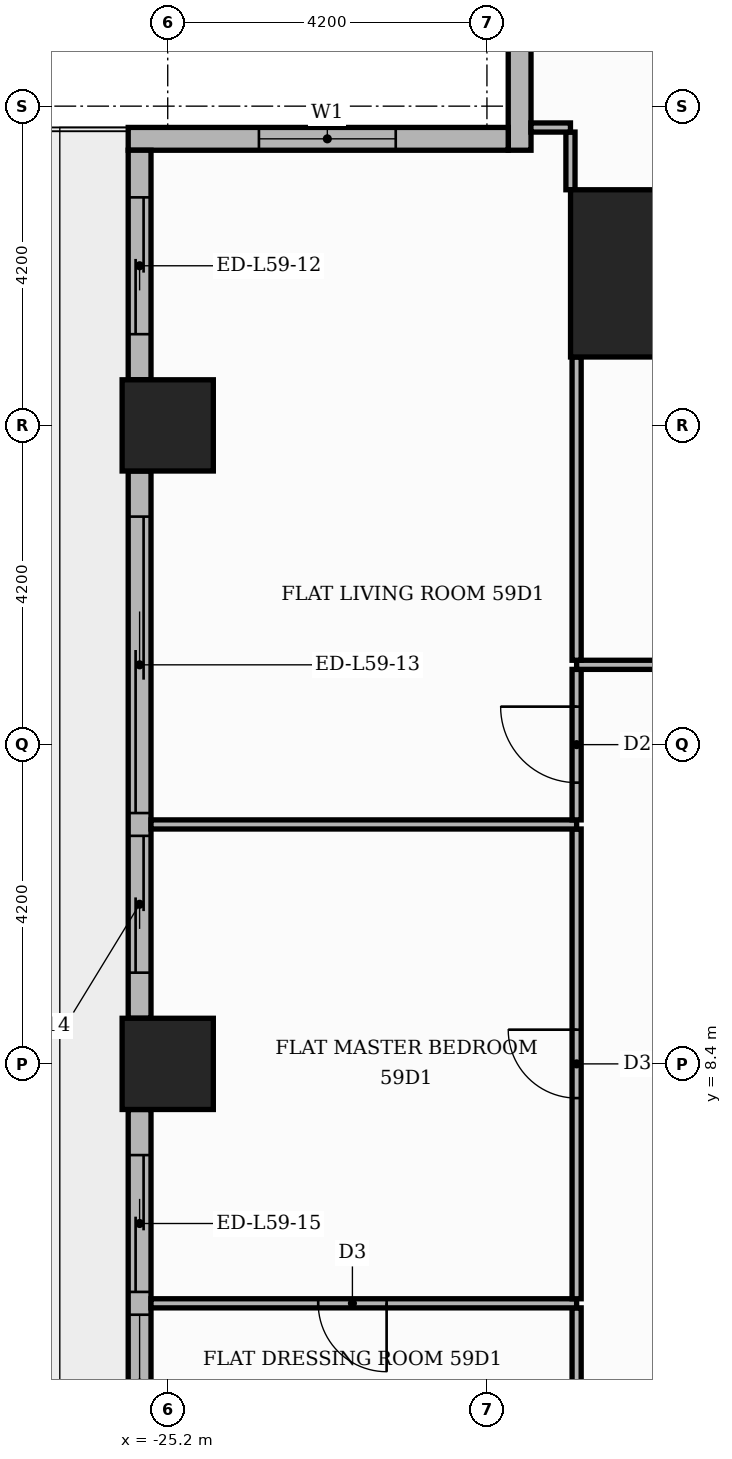
"""IFC4 building model, lengths in metres.
Left out: names, types, materials, properties, quantities, classifications, styles, units other than length and angle.
Written with IfcOpenShell. Run it as: python <this file> out.ifc"""

import sys

from ifc_helpers import new_model, si_unit, direction, frame, frame_2d, origin, origin_2d, place, context, subcontext, project, spatial, rectangle, extrude, element, fill, save


model = new_model("IFC4")
c1 = context("Model", 3, precision=1e-05, world=origin(), true_north=direction((0.0, 1.0)))
c2 = subcontext(c1, "Body", "Model", "MODEL_VIEW")
j1 = project(units=[si_unit("LENGTHUNIT", "METRE"), si_unit("PLANEANGLEUNIT", "RADIAN")], contexts=[c1])
p1 = place(None, origin())
s1 = spatial("IfcSite", under=j1, at=p1, CompositionType="ELEMENT")
p2 = place(p1, origin())
s2 = spatial("IfcBuilding", under=s1, at=p2, CompositionType="ELEMENT")
p3 = place(p2, frame((0.0, 0.0, 248.4)))
s3 = spatial("IfcBuildingStorey", under=s2, at=p3, CompositionType="ELEMENT", Elevation=248.4)
p4 = place(p3, frame((-18.8, 18.8, 0.0), z_axis=(0.0, 0.0, 1.0), x_axis=(1.0, 0.0, 0.0)))
e1 = element("IfcColumn", 1, at=p4, inside=s3, PredefinedType="COLUMN", context=c2, shape_type="SweptSolid", body=[
    extrude(rectangle(XDim=2.2, YDim=2.2, at=origin_2d()), origin(), (0.0, 0.0, 1.0), 3.9),
])
for number, where, z_axis, x_axis in (
    (2, (-25.2, 8.4, 0.0), (0.0, 0.0, 1.0), (1.0, 0.0, 0.0)),
    (3, (-25.2, 16.8, 0.0), (0.0, 0.0, 1.0), (1.0, 0.0, 0.0)),
):
    element("IfcColumn", number, at=place(p3, frame(where, z_axis=z_axis, x_axis=x_axis)), inside=s3, PredefinedType="COLUMN", context=c2, shape_type="SweptSolid", body=[
        extrude(rectangle(XDim=1.2, YDim=1.2, at=origin_2d()), origin(), (0.0, 0.0, 1.0), 3.9),
    ])
p5 = place(p3, frame((-20.57, 25.42, 0.0), z_axis=(0.0, 0.0, 1.0), x_axis=(0.0, -1.0, 0.0)))
e4 = element("IfcWall", 4, at=p5, inside=s3, PredefinedType="STANDARD", context=c2, shape_type="SweptSolid", body=[
    extrude(rectangle(XDim=5.0, YDim=0.3, at=frame_2d((2.5, 0.0))), origin(), (0.0, 0.0, 1.0), 3.48),
])
p6 = place(p5, frame((1.42, 0.0, 0.9)))
e5 = element("IfcOpeningElement", 5, at=p6, cuts=e4, PredefinedType="OPENING", context=c2, shape_type="SweptSolid", body=[
    extrude(rectangle(XDim=1.8, YDim=2.1, at=frame_2d((0.9, 1.05))), frame((0.0, 0.16, 0.0), z_axis=(0.0, -1.0, 0.0), x_axis=(1.0, 0.0, 0.0)), (0.0, 0.0, 1.0), 0.32),
])
p7 = place(p3, frame((-20.72, 20.57, 0.0), z_axis=(0.0, 0.0, 1.0), x_axis=(-1.0, 0.0, 0.0)))
e6 = element("IfcWall", 6, at=p7, inside=s3, PredefinedType="STANDARD", context=c2, shape_type="SweptSolid", body=[
    extrude(rectangle(XDim=5.0, YDim=0.3, at=frame_2d((2.5, 0.0))), origin(), (0.0, 0.0, 1.0), 3.48),
])
p8 = place(p7, frame((1.48, 0.0, 0.9)))
e7 = element("IfcOpeningElement", 7, at=p8, cuts=e6, PredefinedType="OPENING", context=c2, shape_type="SweptSolid", body=[
    extrude(rectangle(XDim=1.8, YDim=2.1, at=frame_2d((0.9, 1.05))), frame((0.0, 0.16, 0.0), z_axis=(0.0, -1.0, 0.0), x_axis=(1.0, 0.0, 0.0)), (0.0, 0.0, 1.0), 0.32),
])
p9 = place(p3, frame((-25.57, 20.42, 0.0), z_axis=(0.0, 0.0, 1.0), x_axis=(0.0, -1.0, 0.0)))
e8 = element("IfcWall", 8, at=p9, inside=s3, PredefinedType="STANDARD", context=c2, shape_type="SweptSolid", body=[
    extrude(rectangle(XDim=3.02, YDim=0.3, at=frame_2d((1.51, 0.0))), origin(), (0.0, 0.0, 1.0), 3.48),
])
p10 = place(p9, frame((0.62, 0.0, 0.0)))
e9 = element("IfcOpeningElement", 9, at=p10, cuts=e8, PredefinedType="OPENING", context=c2, shape_type="SweptSolid", body=[
    extrude(rectangle(XDim=1.8, YDim=2.4, at=frame_2d((0.9, 1.2))), frame((0.0, 0.16, 0.0), z_axis=(0.0, -1.0, 0.0), x_axis=(1.0, 0.0, 0.0)), (0.0, 0.0, 1.0), 0.32),
])
p11 = place(p3, frame((-25.57, 16.2, 0.0), z_axis=(0.0, 0.0, 1.0), x_axis=(0.0, -1.0, 0.0)))
e10 = element("IfcWall", 10, at=p11, inside=s3, PredefinedType="STANDARD", context=c2, shape_type="SweptSolid", body=[
    extrude(rectangle(XDim=7.2, YDim=0.3, at=frame_2d((3.6, 0.0))), origin(), (0.0, 0.0, 1.0), 3.48),
])
p12 = place(p11, frame((0.6, 0.0, 0.0)))
e11 = element("IfcOpeningElement", 11, at=p12, cuts=e10, PredefinedType="OPENING", context=c2, shape_type="SweptSolid", body=[
    extrude(rectangle(XDim=3.9, YDim=2.4, at=frame_2d((1.95, 1.2))), frame((0.0, 0.16, 0.0), z_axis=(0.0, -1.0, 0.0), x_axis=(1.0, 0.0, 0.0)), (0.0, 0.0, 1.0), 0.32),
])
p13 = place(p11, frame((4.8, 0.0, 0.0)))
e12 = element("IfcOpeningElement", 12, at=p13, cuts=e10, PredefinedType="OPENING", context=c2, shape_type="SweptSolid", body=[
    extrude(rectangle(XDim=1.8, YDim=2.4, at=frame_2d((0.9, 1.2))), frame((0.0, 0.16, 0.0), z_axis=(0.0, -1.0, 0.0), x_axis=(1.0, 0.0, 0.0)), (0.0, 0.0, 1.0), 0.32),
])
p14 = place(p3, frame((-25.57, 7.8, 0.0), z_axis=(0.0, 0.0, 1.0), x_axis=(0.0, -1.0, 0.0)))
e13 = element("IfcWall", 13, at=p14, inside=s3, PredefinedType="STANDARD", context=c2, shape_type="SweptSolid", body=[
    extrude(rectangle(XDim=7.2, YDim=0.3, at=frame_2d((3.6, 0.0))), origin(), (0.0, 0.0, 1.0), 3.48),
])
p15 = place(p14, frame((0.6, 0.0, 0.0)))
e14 = element("IfcOpeningElement", 14, at=p15, cuts=e13, PredefinedType="OPENING", context=c2, shape_type="SweptSolid", body=[
    extrude(rectangle(XDim=1.8, YDim=2.4, at=frame_2d((0.9, 1.2))), frame((0.0, 0.16, 0.0), z_axis=(0.0, -1.0, 0.0), x_axis=(1.0, 0.0, 0.0)), (0.0, 0.0, 1.0), 0.32),
])
p16 = place(p14, frame((2.7, 0.0, 0.9)))
e15 = element("IfcOpeningElement", 15, at=p16, cuts=e13, PredefinedType="OPENING", context=c2, shape_type="SweptSolid", body=[
    extrude(rectangle(XDim=1.8, YDim=2.1, at=frame_2d((0.9, 1.05))), frame((0.0, 0.16, 0.0), z_axis=(0.0, -1.0, 0.0), x_axis=(1.0, 0.0, 0.0)), (0.0, 0.0, 1.0), 0.32),
])
p17 = place(p14, frame((4.8, 0.0, 0.9)))
e16 = element("IfcOpeningElement", 16, at=p17, cuts=e13, PredefinedType="OPENING", context=c2, shape_type="SweptSolid", body=[
    extrude(rectangle(XDim=1.8, YDim=2.1, at=frame_2d((0.9, 1.05))), frame((0.0, 0.16, 0.0), z_axis=(0.0, -1.0, 0.0), x_axis=(1.0, 0.0, 0.0)), (0.0, 0.0, 1.0), 0.32),
])
p18 = place(p3, frame((-19.82, 3.21, 0.0), z_axis=(0.0, 0.0, 1.0), x_axis=(0.0, 1.0, 0.0)))
e17 = element("IfcWall", 17, at=p18, inside=s3, PredefinedType="PARTITIONING", context=c2, shape_type="SweptSolid", body=[
    extrude(rectangle(XDim=1.98, YDim=0.12, at=frame_2d((0.99, 0.0))), origin(), (0.0, 0.0, 1.0), 3.48),
])
p19 = place(p3, frame((-25.42, 5.25, 0.0), z_axis=(0.0, 0.0, 1.0), x_axis=(1.0, 0.0, 0.0)))
e18 = element("IfcWall", 18, at=p19, inside=s3, PredefinedType="PARTITIONING", context=c2, shape_type="SweptSolid", body=[
    extrude(rectangle(XDim=5.6, YDim=0.12, at=frame_2d((2.8, 0.0))), origin(), (0.0, 0.0, 1.0), 3.48),
])
p20 = place(p19, frame((2.2, 0.0, 0.0)))
e19 = element("IfcOpeningElement", 19, at=p20, cuts=e18, PredefinedType="OPENING", context=c2, shape_type="SweptSolid", body=[
    extrude(rectangle(XDim=0.9, YDim=2.1, at=frame_2d((0.45, 1.05))), frame((0.0, 0.07, 0.0), z_axis=(0.0, -1.0, 0.0), x_axis=(1.0, 0.0, 0.0)), (0.0, 0.0, 1.0), 0.14),
])
p21 = place(p3, frame((-19.82, 5.31, 0.0), z_axis=(0.0, 0.0, 1.0), x_axis=(0.0, 1.0, 0.0)))
e20 = element("IfcWall", 20, at=p21, inside=s3, PredefinedType="PARTITIONING", context=c2, shape_type="SweptSolid", body=[
    extrude(rectangle(XDim=6.18, YDim=0.12, at=frame_2d((3.09, 0.0))), origin(), (0.0, 0.0, 1.0), 3.48),
])
p22 = place(p21, frame((2.64, 0.0, 0.0)))
e21 = element("IfcOpeningElement", 21, at=p22, cuts=e20, PredefinedType="OPENING", context=c2, shape_type="SweptSolid", body=[
    extrude(rectangle(XDim=0.9, YDim=2.1, at=frame_2d((0.45, 1.05))), frame((0.0, 0.07, 0.0), z_axis=(0.0, -1.0, 0.0), x_axis=(1.0, 0.0, 0.0)), (0.0, 0.0, 1.0), 0.14),
])
p23 = place(p3, frame((-25.42, 11.55, 0.0), z_axis=(0.0, 0.0, 1.0), x_axis=(1.0, 0.0, 0.0)))
e22 = element("IfcWall", 22, at=p23, inside=s3, PredefinedType="PARTITIONING", context=c2, shape_type="SweptSolid", body=[
    extrude(rectangle(XDim=5.6, YDim=0.12, at=frame_2d((2.8, 0.0))), origin(), (0.0, 0.0, 1.0), 3.48),
])
p24 = place(p3, frame((-19.82, 11.61, 0.0), z_axis=(0.0, 0.0, 1.0), x_axis=(0.0, 1.0, 0.0)))
e23 = element("IfcWall", 23, at=p24, inside=s3, PredefinedType="PARTITIONING", context=c2, shape_type="SweptSolid", body=[
    extrude(rectangle(XDim=1.98, YDim=0.12, at=frame_2d((0.99, 0.0))), origin(), (0.0, 0.0, 1.0), 3.48),
])
p25 = place(p24, frame((0.49, 0.0, 0.0)))
e24 = element("IfcOpeningElement", 24, at=p25, cuts=e23, PredefinedType="OPENING", context=c2, shape_type="SweptSolid", body=[
    extrude(rectangle(XDim=1.0, YDim=2.1, at=frame_2d((0.5, 1.05))), frame((0.0, 0.07, 0.0), z_axis=(0.0, -1.0, 0.0), x_axis=(1.0, 0.0, 0.0)), (0.0, 0.0, 1.0), 0.14),
])
p26 = place(p3, frame((-19.82, 13.65, 0.0), z_axis=(0.0, 0.0, 1.0), x_axis=(1.0, 0.0, 0.0)))
e25 = element("IfcWall", 25, at=p26, inside=s3, PredefinedType="PARTITIONING", context=c2, shape_type="SweptSolid", body=[
    extrude(rectangle(XDim=6.17, YDim=0.12, at=frame_2d((3.085, 0.0))), origin(), (0.0, 0.0, 1.0), 3.48),
])
p27 = place(p26, frame((2.635, 0.0, 0.0)))
e26 = element("IfcOpeningElement", 26, at=p27, cuts=e25, PredefinedType="OPENING", context=c2, shape_type="SweptSolid", body=[
    extrude(rectangle(XDim=0.9, YDim=2.1, at=frame_2d((0.45, 1.05))), frame((0.0, 0.07, 0.0), z_axis=(0.0, -1.0, 0.0), x_axis=(1.0, 0.0, 0.0)), (0.0, 0.0, 1.0), 0.14),
])
p28 = place(p3, frame((-19.82, 13.71, 0.0), z_axis=(0.0, 0.0, 1.0), x_axis=(0.0, 1.0, 0.0)))
e27 = element("IfcWall", 27, at=p28, inside=s3, PredefinedType="PARTITIONING", context=c2, shape_type="SweptSolid", body=[
    extrude(rectangle(XDim=3.99, YDim=0.12, at=frame_2d((1.995, 0.0))), origin(), (0.0, 0.0, 1.0), 3.48),
])
p29 = place(p3, frame((-19.901, 19.9, 0.0), z_axis=(0.0, 0.0, 1.0), x_axis=(0.0, 1.0, 0.0)))
e28 = element("IfcWall", 28, at=p29, inside=s3, PredefinedType="PARTITIONING", context=c2, shape_type="SweptSolid", body=[
    extrude(rectangle(XDim=0.759, YDim=0.12, at=frame_2d((0.379, 0.0))), origin(), (0.0, 0.0, 1.0), 3.48),
])
p30 = place(p3, frame((-20.421, 20.719, 0.0), z_axis=(0.0, 0.0, 1.0), x_axis=(1.0, 0.0, 0.0)))
e29 = element("IfcWall", 29, at=p30, inside=s3, PredefinedType="PARTITIONING", context=c2, shape_type="SweptSolid", body=[
    extrude(rectangle(XDim=0.52, YDim=0.12, at=frame_2d((0.26, 0.0))), origin(), (0.0, 0.0, 1.0), 3.48),
])
p31 = place(p8, origin())
e30 = element("IfcWindow", 30, at=p31, inside=s3, PartitioningType="SINGLE_PANEL", PredefinedType="WINDOW", context=c2, shape_type="SweptSolid", body=[
    extrude(rectangle(XDim=1.8, YDim=2.1, at=frame_2d((0.9, 1.05))), frame((0.0, 0.03, 0.0), z_axis=(0.0, -1.0, 0.0), x_axis=(1.0, 0.0, 0.0)), (0.0, 0.0, 1.0), 0.06),
])
fill(e7, e30)
p32 = place(p10, origin())
e31 = element("IfcDoor", 31, at=p32, inside=s3, OperationType="SLIDING_TO_RIGHT", PredefinedType="DOOR", context=c2, shape_type="SweptSolid", body=[
    extrude(rectangle(XDim=1.8, YDim=2.4, at=frame_2d((0.9, 1.2))), frame((0.0, 0.025, 0.0), z_axis=(0.0, -1.0, 0.0), x_axis=(1.0, 0.0, 0.0)), (0.0, 0.0, 1.0), 0.05),
])
fill(e9, e31)
p33 = place(p12, origin())
e32 = element("IfcDoor", 32, at=p33, inside=s3, OperationType="SLIDING_TO_LEFT", PredefinedType="DOOR", context=c2, shape_type="SweptSolid", body=[
    extrude(rectangle(XDim=3.9, YDim=2.4, at=frame_2d((1.95, 1.2))), frame((0.0, 0.025, 0.0), z_axis=(0.0, -1.0, 0.0), x_axis=(1.0, 0.0, 0.0)), (0.0, 0.0, 1.0), 0.05),
])
fill(e11, e32)
p34 = place(p13, origin())
e33 = element("IfcDoor", 33, at=p34, inside=s3, OperationType="SLIDING_TO_RIGHT", PredefinedType="DOOR", context=c2, shape_type="SweptSolid", body=[
    extrude(rectangle(XDim=1.8, YDim=2.4, at=frame_2d((0.9, 1.2))), frame((0.0, 0.025, 0.0), z_axis=(0.0, -1.0, 0.0), x_axis=(1.0, 0.0, 0.0)), (0.0, 0.0, 1.0), 0.05),
])
fill(e12, e33)
p35 = place(p15, origin())
e34 = element("IfcDoor", 34, at=p35, inside=s3, OperationType="SLIDING_TO_LEFT", PredefinedType="DOOR", context=c2, shape_type="SweptSolid", body=[
    extrude(rectangle(XDim=1.8, YDim=2.4, at=frame_2d((0.9, 1.2))), frame((0.0, 0.025, 0.0), z_axis=(0.0, -1.0, 0.0), x_axis=(1.0, 0.0, 0.0)), (0.0, 0.0, 1.0), 0.05),
])
fill(e14, e34)
p36 = place(p16, origin())
e35 = element("IfcWindow", 35, at=p36, inside=s3, PartitioningType="SINGLE_PANEL", PredefinedType="WINDOW", context=c2, shape_type="SweptSolid", body=[
    extrude(rectangle(XDim=1.8, YDim=2.1, at=frame_2d((0.9, 1.05))), frame((0.0, 0.03, 0.0), z_axis=(0.0, -1.0, 0.0), x_axis=(1.0, 0.0, 0.0)), (0.0, 0.0, 1.0), 0.06),
])
fill(e15, e35)
p37 = place(p25, origin())
e36 = element("IfcDoor", 36, at=p37, inside=s3, OperationType="SINGLE_SWING_RIGHT", PredefinedType="DOOR", context=c2, shape_type="SweptSolid", body=[
    extrude(rectangle(XDim=1.0, YDim=2.1, at=frame_2d((0.5, 1.05))), frame((0.0, 0.025, 0.0), z_axis=(0.0, -1.0, 0.0), x_axis=(1.0, 0.0, 0.0)), (0.0, 0.0, 1.0), 0.05),
])
fill(e24, e36)
p38 = place(p22, origin())
e37 = element("IfcDoor", 37, at=p38, inside=s3, OperationType="SINGLE_SWING_RIGHT", PredefinedType="DOOR", context=c2, shape_type="SweptSolid", body=[
    extrude(rectangle(XDim=0.9, YDim=2.1, at=frame_2d((0.45, 1.05))), frame((0.0, 0.025, 0.0), z_axis=(0.0, -1.0, 0.0), x_axis=(1.0, 0.0, 0.0)), (0.0, 0.0, 1.0), 0.05),
])
fill(e21, e37)
p39 = place(p20, frame((0.9, 0.0, 0.0), z_axis=(0.0, 0.0, 1.0), x_axis=(-1.0, 0.0, 0.0)))
e38 = element("IfcDoor", 38, at=p39, inside=s3, OperationType="SINGLE_SWING_RIGHT", PredefinedType="DOOR", context=c2, shape_type="SweptSolid", body=[
    extrude(rectangle(XDim=0.9, YDim=2.1, at=frame_2d((0.45, 1.05))), frame((0.0, 0.025, 0.0), z_axis=(0.0, -1.0, 0.0), x_axis=(1.0, 0.0, 0.0)), (0.0, 0.0, 1.0), 0.05),
])
fill(e19, e38)
save(model, sys.argv[1])
